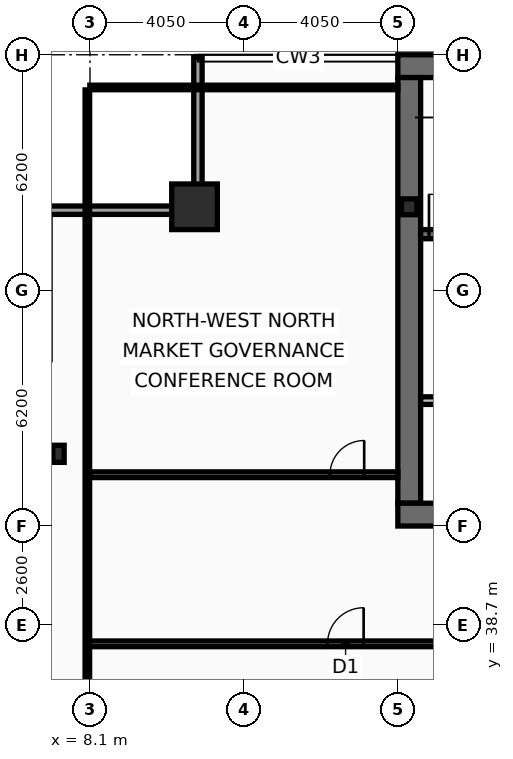
"""IFC4 building model, lengths in metres.
Left out: names, types, materials, properties, quantities, classifications, styles, units other than length and angle.
Written with IfcOpenShell. Run it as: python <this file> out.ifc"""

import sys

from ifc_helpers import new_model, si_unit, direction, frame, frame_2d, origin, origin_2d, place, context, subcontext, project, spatial, rectangle, hollow_rectangle, i_section, extrude, element, fill, save


model = new_model("IFC4")
c1 = context("Model", 3, precision=1e-05, world=origin(), true_north=direction((0.0, 1.0)))
c2 = subcontext(c1, "Body", "Model", "MODEL_VIEW")
j1 = project(units=[si_unit("LENGTHUNIT", "METRE"), si_unit("PLANEANGLEUNIT", "RADIAN")], contexts=[c1])
p1 = place(None, origin())
s1 = spatial("IfcSite", under=j1, at=p1, CompositionType="ELEMENT")
p2 = place(p1, origin())
s2 = spatial("IfcBuilding", under=s1, at=p2, CompositionType="ELEMENT")
p3 = place(p2, frame((0.0, 0.0, 231.8)))
s3 = spatial("IfcBuildingStorey", under=s2, at=p3, CompositionType="ELEMENT", Elevation=231.8)
p4 = place(p3, frame((16.2, 53.4, 0.0), z_axis=(0.0, 0.0, 1.0), x_axis=(1.0, 0.0, 0.0)))
e1 = element("IfcWall", 1, at=p4, inside=s3, PredefinedType="SHEAR", context=c2, shape_type="SweptSolid", body=[
    extrude(rectangle(XDim=40.5, YDim=0.6, at=frame_2d((20.25, 0.0))), origin(), (0.0, 0.0, 1.0), 3.44),
])
p5 = place(p3, frame((16.5, 41.9, 0.0), z_axis=(0.0, 0.0, 1.0), x_axis=(0.0, 1.0, 0.0)))
e2 = element("IfcWall", 2, at=p5, inside=s3, PredefinedType="SHEAR", context=c2, shape_type="SweptSolid", body=[
    extrude(rectangle(XDim=11.2, YDim=0.6, at=frame_2d((5.6, 0.0))), origin(), (0.0, 0.0, 1.0), 3.44),
])
p6 = place(p3, frame((18.65, 41.6, 0.0), z_axis=(0.0, 0.0, 1.0), x_axis=(-1.0, 0.0, 0.0)))
e3 = element("IfcWall", 3, at=p6, inside=s3, PredefinedType="SHEAR", context=c2, shape_type="SweptSolid", body=[
    extrude(rectangle(XDim=2.45, YDim=0.6, at=frame_2d((1.225, 0.0))), origin(), (0.0, 0.0, 1.0), 3.44),
])
p7 = place(p3, frame((16.8, 48.98, 0.0), z_axis=(0.0, 0.0, 1.0), x_axis=(1.0, 0.0, 0.0)))
e4 = element("IfcWall", 4, at=p7, inside=s3, PredefinedType="SHEAR", context=c2, shape_type="SweptSolid", body=[
    extrude(rectangle(XDim=7.42, YDim=0.24, at=frame_2d((3.71, 0.0))), origin(), (0.0, 0.0, 1.0), 3.44),
])
p8 = place(p7, frame((0.22, 0.0, 0.0)))
e5 = element("IfcOpeningElement", 5, at=p8, cuts=e4, PredefinedType="OPENING", context=c2, shape_type="SweptSolid", body=[
    extrude(rectangle(XDim=1.05, YDim=2.15, at=frame_2d((0.525, 1.075))), frame((0.0, 0.13, 0.0), z_axis=(0.0, -1.0, 0.0), x_axis=(1.0, 0.0, 0.0)), (0.0, 0.0, 1.0), 0.26),
])
p9 = place(p3, frame((10.85, 49.7, 0.0), z_axis=(0.0, 0.0, 1.0), x_axis=(1.0, 0.0, 0.0)))
e6 = element("IfcColumn", 6, at=p9, inside=s3, PredefinedType="COLUMN", context=c2, shape_type="SweptSolid", body=[
    extrude(hollow_rectangle(XDim=1.2, YDim=1.2, WallThickness=0.06, at=origin_2d()), origin(), (0.0, 0.0, 1.0), 3.6),
])
p10 = place(p3, frame((7.27, 43.2, 0.0), z_axis=(0.0, 0.0, 1.0), x_axis=(1.0, 0.0, 0.0)))
e7 = element("IfcColumn", 7, at=p10, inside=s3, PredefinedType="COLUMN", context=c2, shape_type="SweptSolid", body=[
    extrude(i_section(OverallWidth=0.3, OverallDepth=0.45, WebThickness=0.014, FlangeThickness=0.026, at=origin_2d()), origin(), (0.0, 0.0, 1.0), 3.6),
])
p11 = place(p3, frame((16.5, 49.7, 0.0), z_axis=(0.0, 0.0, 1.0), x_axis=(1.0, 0.0, 0.0)))
e8 = element("IfcColumn", 8, at=p11, inside=s3, PredefinedType="COLUMN", context=c2, shape_type="SweptSolid", body=[
    extrude(i_section(OverallWidth=0.406, OverallDepth=0.416, WebThickness=0.03, FlangeThickness=0.048, at=origin_2d()), origin(), (0.0, 0.0, 1.0), 3.6),
])
p12 = place(p3, frame((6.83, 49.61, 0.0), z_axis=(0.0, 0.0, 1.0), x_axis=(1.0, 0.0, 0.0)))
e9 = element("IfcWall", 9, at=p12, inside=s3, PredefinedType="SOLIDWALL", context=c2, shape_type="SweptSolid", body=[
    extrude(rectangle(XDim=4.22, YDim=0.22, at=frame_2d((2.11, 0.0))), origin(), (0.0, 0.0, 1.0), 2.83),
])
p13 = place(p3, frame((10.94, 49.72, 0.0), z_axis=(0.0, 0.0, 1.0), x_axis=(0.0, 1.0, 0.0)))
e10 = element("IfcWall", 10, at=p13, inside=s3, PredefinedType="SOLIDWALL", context=c2, shape_type="SweptSolid", body=[
    extrude(rectangle(XDim=3.91, YDim=0.22, at=frame_2d((1.955, 0.0))), origin(), (0.0, 0.0, 1.0), 2.83),
])
p14 = place(p3, frame((16.8, 44.6, 0.0), z_axis=(0.0, 0.0, 1.0), x_axis=(1.0, 0.0, 0.0)))
e11 = element("IfcWall", 11, at=p14, inside=s3, PredefinedType="PARTITIONING", context=c2, shape_type="SweptSolid", body=[
    extrude(rectangle(XDim=4.2, YDim=0.2, at=frame_2d((2.1, 0.0))), origin(), (0.0, 0.0, 1.0), 3.44),
])
p15 = place(p14, frame((1.25, 0.0, 0.0)))
e12 = element("IfcOpeningElement", 12, at=p15, cuts=e11, PredefinedType="OPENING", context=c2, shape_type="SweptSolid", body=[
    extrude(rectangle(XDim=1.05, YDim=2.15, at=frame_2d((0.525, 1.075))), frame((0.0, 0.11, 0.0), z_axis=(0.0, -1.0, 0.0), x_axis=(1.0, 0.0, 0.0)), (0.0, 0.0, 1.0), 0.22),
])
p16 = place(p3, frame((8.03, 38.2, 0.0), z_axis=(0.0, 0.0, 1.0), x_axis=(1.0, 0.0, 0.0)))
e13 = element("IfcWall", 13, at=p16, inside=s3, PredefinedType="PARTITIONING", context=c2, shape_type="SweptSolid", body=[
    extrude(rectangle(XDim=10.52, YDim=0.15, at=frame_2d((5.26, 0.0))), origin(), (0.0, 0.0, 1.0), 2.78),
])
p17 = place(p16, frame((6.32, 0.0, 0.0)))
e14 = element("IfcOpeningElement", 14, at=p17, cuts=e13, PredefinedType="OPENING", context=c2, shape_type="SweptSolid", body=[
    extrude(rectangle(XDim=0.95, YDim=2.05, at=frame_2d((0.475, 1.025))), frame((0.0, 0.085, 0.0), z_axis=(0.0, -1.0, 0.0), x_axis=(1.0, 0.0, 0.0)), (0.0, 0.0, 1.0), 0.17),
])
p18 = place(p3, frame((8.095, 42.65, 0.0), z_axis=(0.0, 0.0, 1.0), x_axis=(1.0, 0.0, 0.0)))
e15 = element("IfcWall", 15, at=p18, inside=s3, PredefinedType="PARTITIONING", context=c2, shape_type="SweptSolid", body=[
    extrude(rectangle(XDim=8.105, YDim=0.15, at=frame_2d((4.052, 0.0))), origin(), (0.0, 0.0, 1.0), 2.78),
])
p19 = place(p18, frame((6.32, 0.0, 0.0)))
e16 = element("IfcOpeningElement", 16, at=p19, cuts=e15, PredefinedType="OPENING", context=c2, shape_type="SweptSolid", body=[
    extrude(rectangle(XDim=0.9, YDim=2.05, at=frame_2d((0.45, 1.025))), frame((0.0, 0.085, 0.0), z_axis=(0.0, -1.0, 0.0), x_axis=(1.0, 0.0, 0.0)), (0.0, 0.0, 1.0), 0.17),
])
p20 = place(p3, frame((8.03, 10.665, 0.0), z_axis=(0.0, 0.0, 1.0), x_axis=(0.0, 1.0, 0.0)))
e17 = element("IfcWall", 17, at=p20, inside=s3, PredefinedType="PARTITIONING", context=c2, shape_type="SweptSolid", body=[
    extrude(rectangle(XDim=42.11, YDim=0.12, at=frame_2d((21.055, 0.0))), origin(), (0.0, 0.0, 1.0), 2.78),
])
p21 = place(p3, frame((8.095, 52.84, 0.0), z_axis=(0.0, 0.0, 1.0), x_axis=(1.0, 0.0, 0.0)))
e18 = element("IfcWall", 18, at=p21, inside=s3, PredefinedType="PARTITIONING", context=c2, shape_type="SweptSolid", body=[
    extrude(rectangle(XDim=8.105, YDim=0.12, at=frame_2d((4.052, 0.0))), origin(), (0.0, 0.0, 1.0), 3.44),
])
p22 = place(p8, origin())
e19 = element("IfcDoor", 19, at=p22, inside=s3, OperationType="SINGLE_SWING_LEFT", PredefinedType="DOOR", context=c2, shape_type="SweptSolid", body=[
    extrude(rectangle(XDim=1.05, YDim=2.15, at=frame_2d((0.525, 1.075))), frame((0.0, 0.025, 0.0), z_axis=(0.0, -1.0, 0.0), x_axis=(1.0, 0.0, 0.0)), (0.0, 0.0, 1.0), 0.05),
])
fill(e5, e19)
p23 = place(p17, origin())
e20 = element("IfcDoor", 20, at=p23, inside=s3, OperationType="SINGLE_SWING_RIGHT", PredefinedType="DOOR", context=c2, shape_type="SweptSolid", body=[
    extrude(rectangle(XDim=0.95, YDim=2.05, at=frame_2d((0.475, 1.025))), frame((0.0, 0.025, 0.0), z_axis=(0.0, -1.0, 0.0), x_axis=(1.0, 0.0, 0.0)), (0.0, 0.0, 1.0), 0.05),
])
fill(e14, e20)
p24 = place(p19, origin())
e21 = element("IfcDoor", 21, at=p24, inside=s3, OperationType="SINGLE_SWING_RIGHT", PredefinedType="DOOR", context=c2, shape_type="SweptSolid", body=[
    extrude(rectangle(XDim=0.9, YDim=2.05, at=frame_2d((0.45, 1.025))), frame((0.0, 0.025, 0.0), z_axis=(0.0, -1.0, 0.0), x_axis=(1.0, 0.0, 0.0)), (0.0, 0.0, 1.0), 0.05),
])
fill(e16, e21)
save(model, sys.argv[1])
